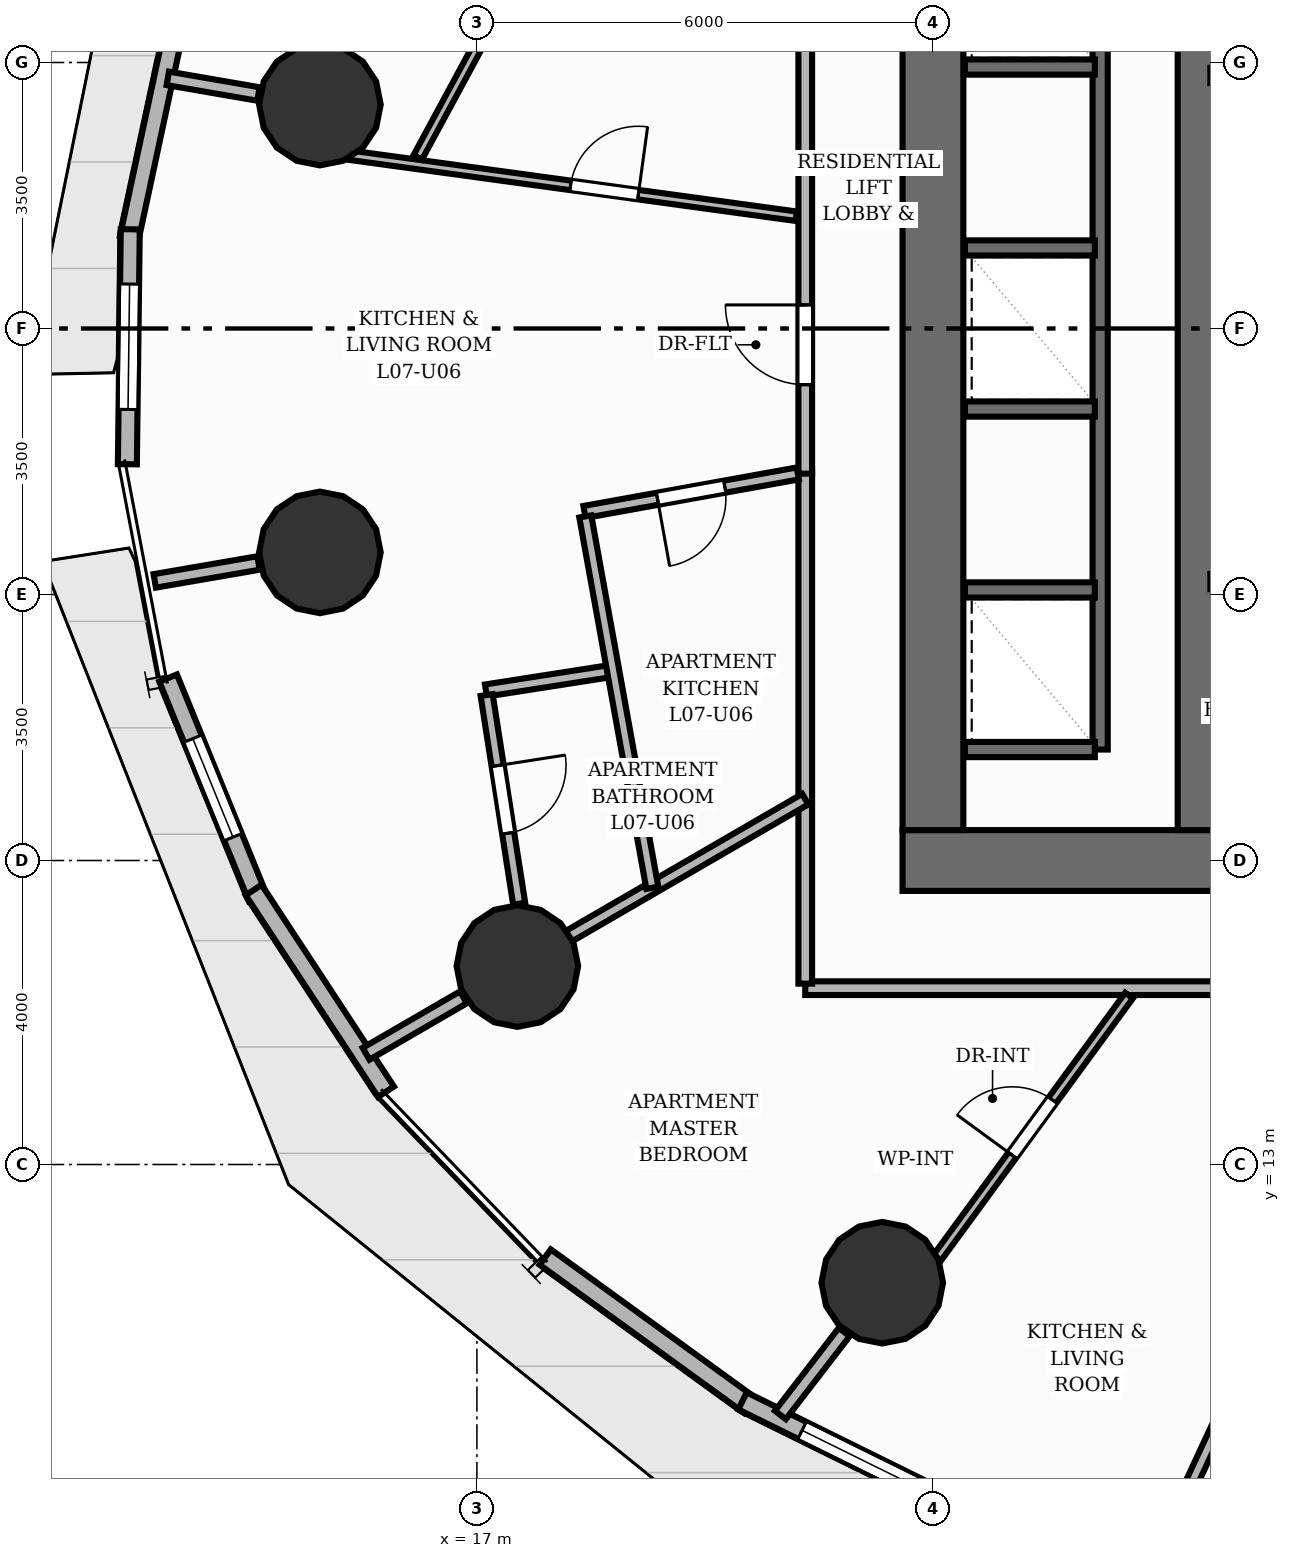
"""IFC4 building model, lengths in metres.
Left out: names, types, materials, properties, quantities, classifications, styles, units other than length and angle.
Written with IfcOpenShell. Run it as: python <this file> out.ifc"""

import sys

from ifc_helpers import new_model, si_unit, direction, frame, frame_2d, origin, origin_2d, place, context, subcontext, project, spatial, rectangle, circle, extrude, element, fill, save


model = new_model("IFC4")
c1 = context("Model", 3, precision=1e-05, world=origin(), true_north=direction((0.0, 1.0)))
c2 = subcontext(c1, "Body", "Model", "MODEL_VIEW")
j1 = project(units=[si_unit("LENGTHUNIT", "METRE"), si_unit("PLANEANGLEUNIT", "RADIAN")], contexts=[c1])
p1 = place(None, origin())
s1 = spatial("IfcSite", under=j1, at=p1, CompositionType="ELEMENT")
p2 = place(p1, origin())
s2 = spatial("IfcBuilding", under=s1, at=p2, CompositionType="ELEMENT")
p3 = place(p2, frame((0.0, 0.0, 28.0)))
s3 = spatial("IfcBuildingStorey", under=s2, at=p3, CompositionType="ELEMENT", Elevation=28.0)
p4 = place(p3, frame((22.6, 17.0, 0.0), z_axis=(0.0, 0.0, 1.0), x_axis=(1.0, 0.0, 0.0)))
e1 = element("IfcWall", 1, at=p4, inside=s3, PredefinedType="SHEAR", context=c2, shape_type="SweptSolid", body=[
    extrude(rectangle(XDim=18.8, YDim=0.8, at=frame_2d((9.4, 0.0))), origin(), (0.0, 0.0, 1.0), 3.2),
])
p5 = place(p4, frame((5.9, 0.0, 0.0)))
e2 = element("IfcOpeningElement", 2, at=p5, cuts=e1, PredefinedType="OPENING", context=c2, shape_type="SweptSolid", body=[
    extrude(rectangle(XDim=1.1, YDim=2.15, at=frame_2d((0.55, 1.075))), frame((0.0, 0.41, 0.0), z_axis=(0.0, -1.0, 0.0), x_axis=(1.0, 0.0, 0.0)), (0.0, 0.0, 1.0), 0.82),
])
p6 = place(p4, frame((9.45, 0.0, 0.0)))
e3 = element("IfcOpeningElement", 3, at=p6, cuts=e1, PredefinedType="OPENING", context=c2, shape_type="SweptSolid", body=[
    extrude(rectangle(XDim=0.9, YDim=2.1, at=frame_2d((0.45, 1.05))), frame((0.0, 0.41, 0.0), z_axis=(0.0, -1.0, 0.0), x_axis=(1.0, 0.0, 0.0)), (0.0, 0.0, 1.0), 0.82),
])
p7 = place(p3, frame((23.0, 17.4, 0.0), z_axis=(0.0, 0.0, 1.0), x_axis=(0.0, 1.0, 0.0)))
e4 = element("IfcWall", 4, at=p7, inside=s3, PredefinedType="SHEAR", context=c2, shape_type="SweptSolid", body=[
    extrude(rectangle(XDim=13.2, YDim=0.8, at=frame_2d((6.6, 0.0))), origin(), (0.0, 0.0, 1.0), 3.2),
])
p8 = place(p3, frame((26.5, 17.4, 0.0), z_axis=(0.0, 0.0, 1.0), x_axis=(0.0, 1.0, 0.0)))
e5 = element("IfcWall", 5, at=p8, inside=s3, PredefinedType="SHEAR", context=c2, shape_type="SweptSolid", body=[
    extrude(rectangle(XDim=13.2, YDim=0.56, at=frame_2d((6.6, 0.0))), origin(), (0.0, 0.0, 1.0), 3.2),
])
for number, where, z_axis, x_axis in (
    (6, (14.934, 26.946, 0.0), (0.0, 0.0, 1.0), (1.0, 0.0, 0.0)),
    (7, (14.934, 21.054, 0.0), (0.0, 0.0, 1.0), (1.0, 0.0, 0.0)),
    (8, (17.532, 15.611, 0.0), (0.0, 0.0, 1.0), (1.0, 0.0, 0.0)),
    (9, (22.333, 11.445, 0.0), (0.0, 0.0, 1.0), (1.0, 0.0, 0.0)),
):
    element("IfcColumn", number, at=place(p3, frame(where, z_axis=z_axis, x_axis=x_axis)), inside=s3, PredefinedType="COLUMN", context=c2, shape_type="SweptSolid", body=[
        extrude(circle(Radius=0.8, at=origin_2d()), origin(), (0.0, 0.0, 1.0), 3.2),
    ])
p9 = place(p3, frame((12.427, 25.192, 0.0), z_axis=(0.0, 0.0, 1.0), x_axis=(0.209668000253, 0.977772637002, 0.0)))
e10 = element("IfcWall", 10, at=p9, inside=s3, PredefinedType="SOLIDWALL", context=c2, shape_type="SweptSolid", body=[
    extrude(rectangle(XDim=3.121, YDim=0.25, at=frame_2d((1.56, 0.0))), origin(), (0.0, 0.0, 1.0), 2.96),
])
p10 = place(p3, frame((12.401, 22.214, 0.0), z_axis=(0.0, 0.0, 1.0), x_axis=(0.012397373015, 0.999923149618, 0.0)))
e11 = element("IfcWall", 11, at=p10, inside=s3, PredefinedType="SOLIDWALL", context=c2, shape_type="SweptSolid", body=[
    extrude(rectangle(XDim=3.092, YDim=0.25, at=frame_2d((1.546, 0.0))), origin(), (0.0, 0.0, 1.0), 2.96),
])
p11 = place(p10, frame((0.721, 0.0, 0.85)))
e12 = element("IfcOpeningElement", 12, at=p11, cuts=e11, PredefinedType="OPENING", context=c2, shape_type="SweptSolid", body=[
    extrude(rectangle(XDim=1.65, YDim=1.55, at=frame_2d((0.825, 0.775))), frame((0.0, 0.135, 0.0), z_axis=(0.0, -1.0, 0.0), x_axis=(1.0, 0.0, 0.0)), (0.0, 0.0, 1.0), 0.27),
])
p12 = place(p3, frame((14.115, 16.511, 0.0), z_axis=(0.0, 0.0, 1.0), x_axis=(-0.377493207518, 0.926012353199, 0.0)))
e13 = element("IfcWall", 13, at=p12, inside=s3, PredefinedType="SOLIDWALL", context=c2, shape_type="SweptSolid", body=[
    extrude(rectangle(XDim=3.121, YDim=0.25, at=frame_2d((1.56, 0.0))), origin(), (0.0, 0.0, 1.0), 2.96),
])
p13 = place(p12, frame((0.86, 0.0, 0.85)))
e14 = element("IfcOpeningElement", 14, at=p13, cuts=e13, PredefinedType="OPENING", context=c2, shape_type="SweptSolid", body=[
    extrude(rectangle(XDim=1.4, YDim=1.55, at=frame_2d((0.7, 0.775))), frame((0.0, 0.135, 0.0), z_axis=(0.0, -1.0, 0.0), x_axis=(1.0, 0.0, 0.0)), (0.0, 0.0, 1.0), 0.27),
])
p14 = place(p3, frame((15.804, 13.958, 0.0), z_axis=(0.0, 0.0, 1.0), x_axis=(-0.548579153619, 0.836098625889, 0.0)))
e15 = element("IfcWall", 15, at=p14, inside=s3, PredefinedType="SOLIDWALL", context=c2, shape_type="SweptSolid", body=[
    extrude(rectangle(XDim=3.174, YDim=0.25, at=frame_2d((1.587, 0.0))), origin(), (0.0, 0.0, 1.0), 2.96),
])
p15 = place(p3, frame((20.589, 9.832, 0.0), z_axis=(0.0, 0.0, 1.0), x_axis=(-0.809637503316, 0.58693024562, 0.0)))
e16 = element("IfcWall", 16, at=p15, inside=s3, PredefinedType="SOLIDWALL", context=c2, shape_type="SweptSolid", body=[
    extrude(rectangle(XDim=3.323, YDim=0.25, at=frame_2d((1.661, 0.0))), origin(), (0.0, 0.0, 1.0), 2.96),
])
p16 = place(p3, frame((23.542, 8.385, 0.0), z_axis=(0.0, 0.0, 1.0), x_axis=(-0.896727977212, 0.442582122193, 0.0)))
e17 = element("IfcWall", 17, at=p16, inside=s3, PredefinedType="SOLIDWALL", context=c2, shape_type="SweptSolid", body=[
    extrude(rectangle(XDim=3.399, YDim=0.25, at=frame_2d((1.7, 0.0))), origin(), (0.0, 0.0, 1.0), 2.96),
])
p17 = place(p16, frame((0.875, 0.0, 0.85)))
e18 = element("IfcOpeningElement", 18, at=p17, cuts=e17, PredefinedType="OPENING", context=c2, shape_type="SweptSolid", body=[
    extrude(rectangle(XDim=1.65, YDim=1.29, at=frame_2d((0.825, 0.645))), frame((0.0, 0.135, 0.0), z_axis=(0.0, -1.0, 0.0), x_axis=(1.0, 0.0, 0.0)), (0.0, 0.0, 1.0), 0.27),
])
p18 = place(p3, frame((26.65, 27.33, 0.0), z_axis=(0.0, 0.0, 1.0), x_axis=(1.0, 0.0, 0.0)))
e19 = element("IfcWall", 19, at=p18, inside=s3, PredefinedType="SHEAR", context=c2, shape_type="SweptSolid", body=[
    extrude(rectangle(XDim=3.24, YDim=0.2, at=frame_2d((1.62, 0.0))), origin(), (0.0, 0.0, 1.0), 3.2),
])
p19 = place(p3, frame((26.65, 20.67, 0.0), z_axis=(0.0, 0.0, 1.0), x_axis=(1.0, 0.0, 0.0)))
e20 = element("IfcWall", 20, at=p19, inside=s3, PredefinedType="SHEAR", context=c2, shape_type="SweptSolid", body=[
    extrude(rectangle(XDim=3.24, YDim=0.2, at=frame_2d((1.62, 0.0))), origin(), (0.0, 0.0, 1.0), 3.2),
])
p20 = place(p19, frame((1.055, 0.0, 0.0)))
e21 = element("IfcOpeningElement", 21, at=p20, cuts=e20, PredefinedType="OPENING", context=c2, shape_type="SweptSolid", body=[
    extrude(rectangle(XDim=1.05, YDim=2.15, at=frame_2d((0.525, 1.075))), frame((0.0, 0.11, 0.0), z_axis=(0.0, -1.0, 0.0), x_axis=(1.0, 0.0, 0.0)), (0.0, 0.0, 1.0), 0.22),
])
p21 = place(p3, frame((25.2, 18.46, 0.0), z_axis=(0.0, 0.0, 1.0), x_axis=(0.0, 1.0, 0.0)))
e22 = element("IfcWall", 22, at=p21, inside=s3, PredefinedType="SHEAR", context=c2, shape_type="SweptSolid", body=[
    extrude(rectangle(XDim=11.08, YDim=0.2, at=frame_2d((5.54, 0.0))), origin(), (0.0, 0.0, 1.0), 3.2),
])
for number, where, z_axis, x_axis in (
    (23, (23.42, 18.46, 0.0), (0.0, 0.0, 1.0), (1.0, 0.0, 0.0)),
    (24, (23.42, 20.56, 0.0), (0.0, 0.0, 1.0), (1.0, 0.0, 0.0)),
    (25, (23.42, 22.94, 0.0), (0.0, 0.0, 1.0), (1.0, 0.0, 0.0)),
    (26, (23.42, 25.06, 0.0), (0.0, 0.0, 1.0), (1.0, 0.0, 0.0)),
    (27, (23.42, 27.44, 0.0), (0.0, 0.0, 1.0), (1.0, 0.0, 0.0)),
):
    element("IfcWall", number, at=place(p3, frame(where, z_axis=z_axis, x_axis=x_axis)), inside=s3, PredefinedType="SHEAR", context=c2, shape_type="SweptSolid", body=[
        extrude(rectangle(XDim=1.71, YDim=0.2, at=frame_2d((0.855, 0.0))), origin(), (0.0, 0.0, 1.0), 3.2),
    ])
p22 = place(p3, frame((14.126, 27.085, 0.0), z_axis=(0.0, 0.0, 1.0), x_axis=(-0.985412344637, 0.170183756676, 0.0)))
e28 = element("IfcWall", 28, at=p22, inside=s3, PredefinedType="PARTITIONING", context=c2, shape_type="SweptSolid", body=[
    extrude(rectangle(XDim=1.211, YDim=0.18, at=frame_2d((0.605, 0.0))), origin(), (0.0, 0.0, 1.0), 2.178),
])
p23 = place(p3, frame((14.126, 20.915, 0.0), z_axis=(0.0, 0.0, 1.0), x_axis=(-0.985429571056, -0.170083980696, 0.0)))
e29 = element("IfcWall", 29, at=p23, inside=s3, PredefinedType="PARTITIONING", context=c2, shape_type="SweptSolid", body=[
    extrude(rectangle(XDim=1.385, YDim=0.18, at=frame_2d((0.693, 0.0))), origin(), (0.0, 0.0, 1.0), 2.178),
])
p24 = place(p3, frame((16.823, 15.2, 0.0), z_axis=(0.0, 0.0, 1.0), x_axis=(-0.865049792178, -0.501686014408, 0.0)))
e30 = element("IfcWall", 30, at=p24, inside=s3, PredefinedType="PARTITIONING", context=c2, shape_type="SweptSolid", body=[
    extrude(rectangle(XDim=1.481, YDim=0.18, at=frame_2d((0.74, 0.0))), origin(), (0.0, 0.0, 1.0), 2.178),
])
p25 = place(p3, frame((21.833, 10.795, 0.0), z_axis=(0.0, 0.0, 1.0), x_axis=(-0.609967804345, -0.792426196982, 0.0)))
e31 = element("IfcWall", 31, at=p25, inside=s3, PredefinedType="PARTITIONING", context=c2, shape_type="SweptSolid", body=[
    extrude(rectangle(XDim=1.377, YDim=0.18, at=frame_2d((0.688, 0.0))), origin(), (0.0, 0.0, 1.0), 2.178),
])
p26 = place(p3, frame((33.898, 15.32, 0.0), z_axis=(0.0, 0.0, 1.0), x_axis=(-1.0, 0.0, 0.0)))
e32 = element("IfcWall", 32, at=p26, inside=s3, PredefinedType="PARTITIONING", context=c2, shape_type="SweptSolid", body=[
    extrude(rectangle(XDim=12.578, YDim=0.18, at=frame_2d((6.289, 0.0))), origin(), (0.0, 0.0, 1.0), 2.955),
])
p27 = place(p26, frame((5.833, 0.0, 0.0)))
e33 = element("IfcOpeningElement", 33, at=p27, cuts=e32, PredefinedType="OPENING", context=c2, shape_type="SweptSolid", body=[
    extrude(rectangle(XDim=1.05, YDim=2.15, at=frame_2d((0.525, 1.075))), frame((0.0, 0.1, 0.0), z_axis=(0.0, -1.0, 0.0), x_axis=(1.0, 0.0, 0.0)), (0.0, 0.0, 1.0), 0.2),
])
p28 = place(p3, frame((21.32, 15.38, 0.0), z_axis=(0.0, 0.0, 1.0), x_axis=(0.0, 1.0, 0.0)))
e34 = element("IfcWall", 34, at=p28, inside=s3, PredefinedType="PARTITIONING", context=c2, shape_type="SweptSolid", body=[
    extrude(rectangle(XDim=6.749, YDim=0.18, at=frame_2d((3.374, 0.0))), origin(), (0.0, 0.0, 1.0), 2.955),
])
p29 = place(p3, frame((21.32, 22.09, 0.0), z_axis=(0.0, 0.0, 1.0), x_axis=(0.0, 1.0, 0.0)))
e35 = element("IfcWall", 35, at=p29, inside=s3, PredefinedType="PARTITIONING", context=c2, shape_type="SweptSolid", body=[
    extrude(rectangle(XDim=10.59, YDim=0.18, at=frame_2d((5.295, 0.0))), origin(), (0.0, 0.0, 1.0), 2.955),
])
p30 = place(p29, frame((1.17, 0.0, 0.0)))
e36 = element("IfcOpeningElement", 36, at=p30, cuts=e35, PredefinedType="OPENING", context=c2, shape_type="SweptSolid", body=[
    extrude(rectangle(XDim=1.05, YDim=2.15, at=frame_2d((0.525, 1.075))), frame((0.0, 0.1, 0.0), z_axis=(0.0, -1.0, 0.0), x_axis=(1.0, 0.0, 0.0)), (0.0, 0.0, 1.0), 0.2),
])
p31 = place(p3, frame((29.39, 15.229, 0.0), z_axis=(0.0, 0.0, 1.0), x_axis=(-0.421930101453, -0.906628363492, 0.0)))
e37 = element("IfcWall", 37, at=p31, inside=s3, PredefinedType="PLUMBINGWALL", context=c2, shape_type="SweptSolid", body=[
    extrude(rectangle(XDim=8.312, YDim=0.16, at=frame_2d((4.156, 0.0))), origin(), (0.0, 0.0, 1.0), 2.955),
])
p32 = place(p31, frame((3.706, 0.0, 0.0)))
e38 = element("IfcOpeningElement", 38, at=p32, cuts=e37, PredefinedType="OPENING", context=c2, shape_type="SweptSolid", body=[
    extrude(rectangle(XDim=0.9, YDim=2.1, at=frame_2d((0.45, 1.05))), frame((0.0, 0.09, 0.0), z_axis=(0.0, -1.0, 0.0), x_axis=(1.0, 0.0, 0.0)), (0.0, 0.0, 1.0), 0.18),
])
p33 = place(p3, frame((23.038, 11.747, 0.0), z_axis=(0.0, 0.0, 1.0), x_axis=(0.590387510638, 0.807119933642, 0.0)))
e39 = element("IfcWall", 39, at=p33, inside=s3, PredefinedType="PARTITIONING", context=c2, shape_type="SweptSolid", body=[
    extrude(rectangle(XDim=4.306, YDim=0.125, at=frame_2d((2.153, 0.0))), origin(), (0.0, 0.0, 1.0), 2.178),
])
p34 = place(p33, frame((1.703, 0.0, 0.0)))
e40 = element("IfcOpeningElement", 40, at=p34, cuts=e39, PredefinedType="OPENING", context=c2, shape_type="SweptSolid", body=[
    extrude(rectangle(XDim=0.9, YDim=2.1, at=frame_2d((0.45, 1.05))), frame((0.0, 0.073, 0.0), z_axis=(0.0, -1.0, 0.0), x_axis=(1.0, 0.0, 0.0)), (0.0, 0.0, 1.0), 0.145),
])
p35 = place(p3, frame((18.202, 15.999, 0.0), z_axis=(0.0, 0.0, 1.0), x_axis=(0.865099964078, 0.501599493773, 0.0)))
e41 = element("IfcWall", 41, at=p35, inside=s3, PredefinedType="PLUMBINGWALL", context=c2, shape_type="SweptSolid", body=[
    extrude(rectangle(XDim=3.605, YDim=0.16, at=frame_2d((1.802, 0.0))), origin(), (0.0, 0.0, 1.0), 2.178),
])
p36 = place(p3, frame((18.792, 19.498, 0.0), z_axis=(0.0, 0.0, 1.0), x_axis=(-0.988061441457, -0.154060338524, 0.0)))
e42 = element("IfcWall", 42, at=p36, inside=s3, PredefinedType="PLUMBINGWALL", context=c2, shape_type="SweptSolid", body=[
    extrude(rectangle(XDim=1.694, YDim=0.16, at=frame_2d((0.847, 0.0))), origin(), (0.0, 0.0, 1.0), 2.955),
])
p37 = place(p3, frame((17.128, 19.177, 0.0), z_axis=(0.0, 0.0, 1.0), x_axis=(0.154135750111, -0.988049680197, 0.0)))
e43 = element("IfcWall", 43, at=p37, inside=s3, PredefinedType="PLUMBINGWALL", context=c2, shape_type="SweptSolid", body=[
    extrude(rectangle(XDim=2.78, YDim=0.16, at=frame_2d((1.39, 0.0))), origin(), (0.0, 0.0, 1.0), 2.955),
])
p38 = place(p37, frame((0.94, 0.0, 0.0)))
e44 = element("IfcOpeningElement", 44, at=p38, cuts=e43, PredefinedType="OPENING", context=c2, shape_type="SweptSolid", body=[
    extrude(rectangle(XDim=0.9, YDim=2.1, at=frame_2d((0.45, 1.05))), frame((0.0, 0.09, 0.0), z_axis=(0.0, -1.0, 0.0), x_axis=(1.0, 0.0, 0.0)), (0.0, 0.0, 1.0), 0.18),
])
p39 = place(p3, frame((15.33, 26.28, 0.0), z_axis=(0.0, 0.0, 1.0), x_axis=(0.990775681502, -0.135512172681, 0.0)))
e45 = element("IfcWall", 45, at=p39, inside=s3, PredefinedType="PARTITIONING", context=c2, shape_type="SweptSolid", body=[
    extrude(rectangle(XDim=5.926, YDim=0.125, at=frame_2d((2.963, 0.0))), origin(), (0.0, 0.0, 1.0), 2.955),
])
p40 = place(p39, frame((2.929, 0.0, 0.0)))
e46 = element("IfcOpeningElement", 46, at=p40, cuts=e45, PredefinedType="OPENING", context=c2, shape_type="SweptSolid", body=[
    extrude(rectangle(XDim=0.9, YDim=2.1, at=frame_2d((0.45, 1.05))), frame((0.0, 0.073, 0.0), z_axis=(0.0, -1.0, 0.0), x_axis=(1.0, 0.0, 0.0)), (0.0, 0.0, 1.0), 0.145),
])
p41 = place(p3, frame((21.222, 22.093, 0.0), z_axis=(0.0, 0.0, 1.0), x_axis=(-0.984110100035, -0.177559316875, 0.0)))
e47 = element("IfcWall", 47, at=p41, inside=s3, PredefinedType="PLUMBINGWALL", context=c2, shape_type="SweptSolid", body=[
    extrude(rectangle(XDim=2.852, YDim=0.16, at=frame_2d((1.426, 0.0))), origin(), (0.0, 0.0, 1.0), 2.178),
])
p42 = place(p41, frame((0.976, 0.0, 0.0)))
e48 = element("IfcOpeningElement", 48, at=p42, cuts=e47, PredefinedType="OPENING", context=c2, shape_type="SweptSolid", body=[
    extrude(rectangle(XDim=0.9, YDim=2.1, at=frame_2d((0.45, 1.05))), frame((0.0, 0.09, 0.0), z_axis=(0.0, -1.0, 0.0), x_axis=(1.0, 0.0, 0.0)), (0.0, 0.0, 1.0), 0.18),
])
p43 = place(p3, frame((18.426, 21.527, 0.0), z_axis=(0.0, 0.0, 1.0), x_axis=(0.177634916986, -0.98409645679, 0.0)))
e49 = element("IfcWall", 49, at=p43, inside=s3, PredefinedType="PLUMBINGWALL", context=c2, shape_type="SweptSolid", body=[
    extrude(rectangle(XDim=4.966, YDim=0.16, at=frame_2d((2.483, 0.0))), origin(), (0.0, 0.0, 1.0), 2.955),
])
p44 = place(p3, frame((16.222, 26.252, 0.0), z_axis=(0.0, 0.0, 1.0), x_axis=(0.475374660533, 0.879783457519, 0.0)))
e50 = element("IfcWall", 50, at=p44, inside=s3, PredefinedType="PARTITIONING", context=c2, shape_type="SweptSolid", body=[
    extrude(rectangle(XDim=11.37, YDim=0.125, at=frame_2d((5.685, 0.0))), origin(), (0.0, 0.0, 1.0), 2.328),
])
p45 = place(p44, frame((4.255, 0.0, 0.0)))
e51 = element("IfcOpeningElement", 51, at=p45, cuts=e50, PredefinedType="OPENING", context=c2, shape_type="SweptSolid", body=[
    extrude(rectangle(XDim=0.9, YDim=2.1, at=frame_2d((0.45, 1.05))), frame((0.0, 0.073, 0.0), z_axis=(0.0, -1.0, 0.0), x_axis=(1.0, 0.0, 0.0)), (0.0, 0.0, 1.0), 0.145),
])
p46 = place(p11, origin())
e52 = element("IfcWindow", 52, at=p46, inside=s3, PartitioningType="SINGLE_PANEL", PredefinedType="WINDOW", context=c2, shape_type="SweptSolid", body=[
    extrude(rectangle(XDim=1.65, YDim=1.55, at=frame_2d((0.825, 0.775))), frame((0.0, 0.03, 0.0), z_axis=(0.0, -1.0, 0.0), x_axis=(1.0, 0.0, 0.0)), (0.0, 0.0, 1.0), 0.06),
])
fill(e12, e52)
p47 = place(p13, origin())
e53 = element("IfcWindow", 53, at=p47, inside=s3, PartitioningType="SINGLE_PANEL", PredefinedType="WINDOW", context=c2, shape_type="SweptSolid", body=[
    extrude(rectangle(XDim=1.4, YDim=1.55, at=frame_2d((0.7, 0.775))), frame((0.0, 0.03, 0.0), z_axis=(0.0, -1.0, 0.0), x_axis=(1.0, 0.0, 0.0)), (0.0, 0.0, 1.0), 0.06),
])
fill(e14, e53)
p48 = place(p17, origin())
e54 = element("IfcWindow", 54, at=p48, inside=s3, PartitioningType="SINGLE_PANEL", PredefinedType="WINDOW", context=c2, shape_type="SweptSolid", body=[
    extrude(rectangle(XDim=1.65, YDim=1.29, at=frame_2d((0.825, 0.645))), frame((0.0, 0.03, 0.0), z_axis=(0.0, -1.0, 0.0), x_axis=(1.0, 0.0, 0.0)), (0.0, 0.0, 1.0), 0.06),
])
fill(e18, e54)
p49 = place(p34, origin())
e55 = element("IfcDoor", 55, at=p49, inside=s3, OperationType="SINGLE_SWING_LEFT", PredefinedType="DOOR", context=c2, shape_type="SweptSolid", body=[
    extrude(rectangle(XDim=0.9, YDim=2.1, at=frame_2d((0.45, 1.05))), frame((0.0, 0.025, 0.0), z_axis=(0.0, -1.0, 0.0), x_axis=(1.0, 0.0, 0.0)), (0.0, 0.0, 1.0), 0.05),
])
fill(e40, e55)
p50 = place(p30, origin())
e56 = element("IfcDoor", 56, at=p50, inside=s3, OperationType="SINGLE_SWING_RIGHT", PredefinedType="DOOR", context=c2, shape_type="SweptSolid", body=[
    extrude(rectangle(XDim=1.05, YDim=2.15, at=frame_2d((0.525, 1.075))), frame((0.0, 0.025, 0.0), z_axis=(0.0, -1.0, 0.0), x_axis=(1.0, 0.0, 0.0)), (0.0, 0.0, 1.0), 0.05),
])
fill(e36, e56)
p51 = place(p38, origin())
e57 = element("IfcDoor", 57, at=p51, inside=s3, OperationType="SINGLE_SWING_LEFT", PredefinedType="DOOR", context=c2, shape_type="SweptSolid", body=[
    extrude(rectangle(XDim=0.9, YDim=2.1, at=frame_2d((0.45, 1.05))), frame((0.0, 0.025, 0.0), z_axis=(0.0, -1.0, 0.0), x_axis=(1.0, 0.0, 0.0)), (0.0, 0.0, 1.0), 0.05),
])
fill(e44, e57)
p52 = place(p40, origin())
e58 = element("IfcDoor", 58, at=p52, inside=s3, OperationType="SINGLE_SWING_RIGHT", PredefinedType="DOOR", context=c2, shape_type="SweptSolid", body=[
    extrude(rectangle(XDim=0.9, YDim=2.1, at=frame_2d((0.45, 1.05))), frame((0.0, 0.025, 0.0), z_axis=(0.0, -1.0, 0.0), x_axis=(1.0, 0.0, 0.0)), (0.0, 0.0, 1.0), 0.05),
])
fill(e46, e58)
p53 = place(p42, origin())
e59 = element("IfcDoor", 59, at=p53, inside=s3, OperationType="SINGLE_SWING_RIGHT", PredefinedType="DOOR", context=c2, shape_type="SweptSolid", body=[
    extrude(rectangle(XDim=0.9, YDim=2.1, at=frame_2d((0.45, 1.05))), frame((0.0, 0.025, 0.0), z_axis=(0.0, -1.0, 0.0), x_axis=(1.0, 0.0, 0.0)), (0.0, 0.0, 1.0), 0.05),
])
fill(e48, e59)
save(model, sys.argv[1])
